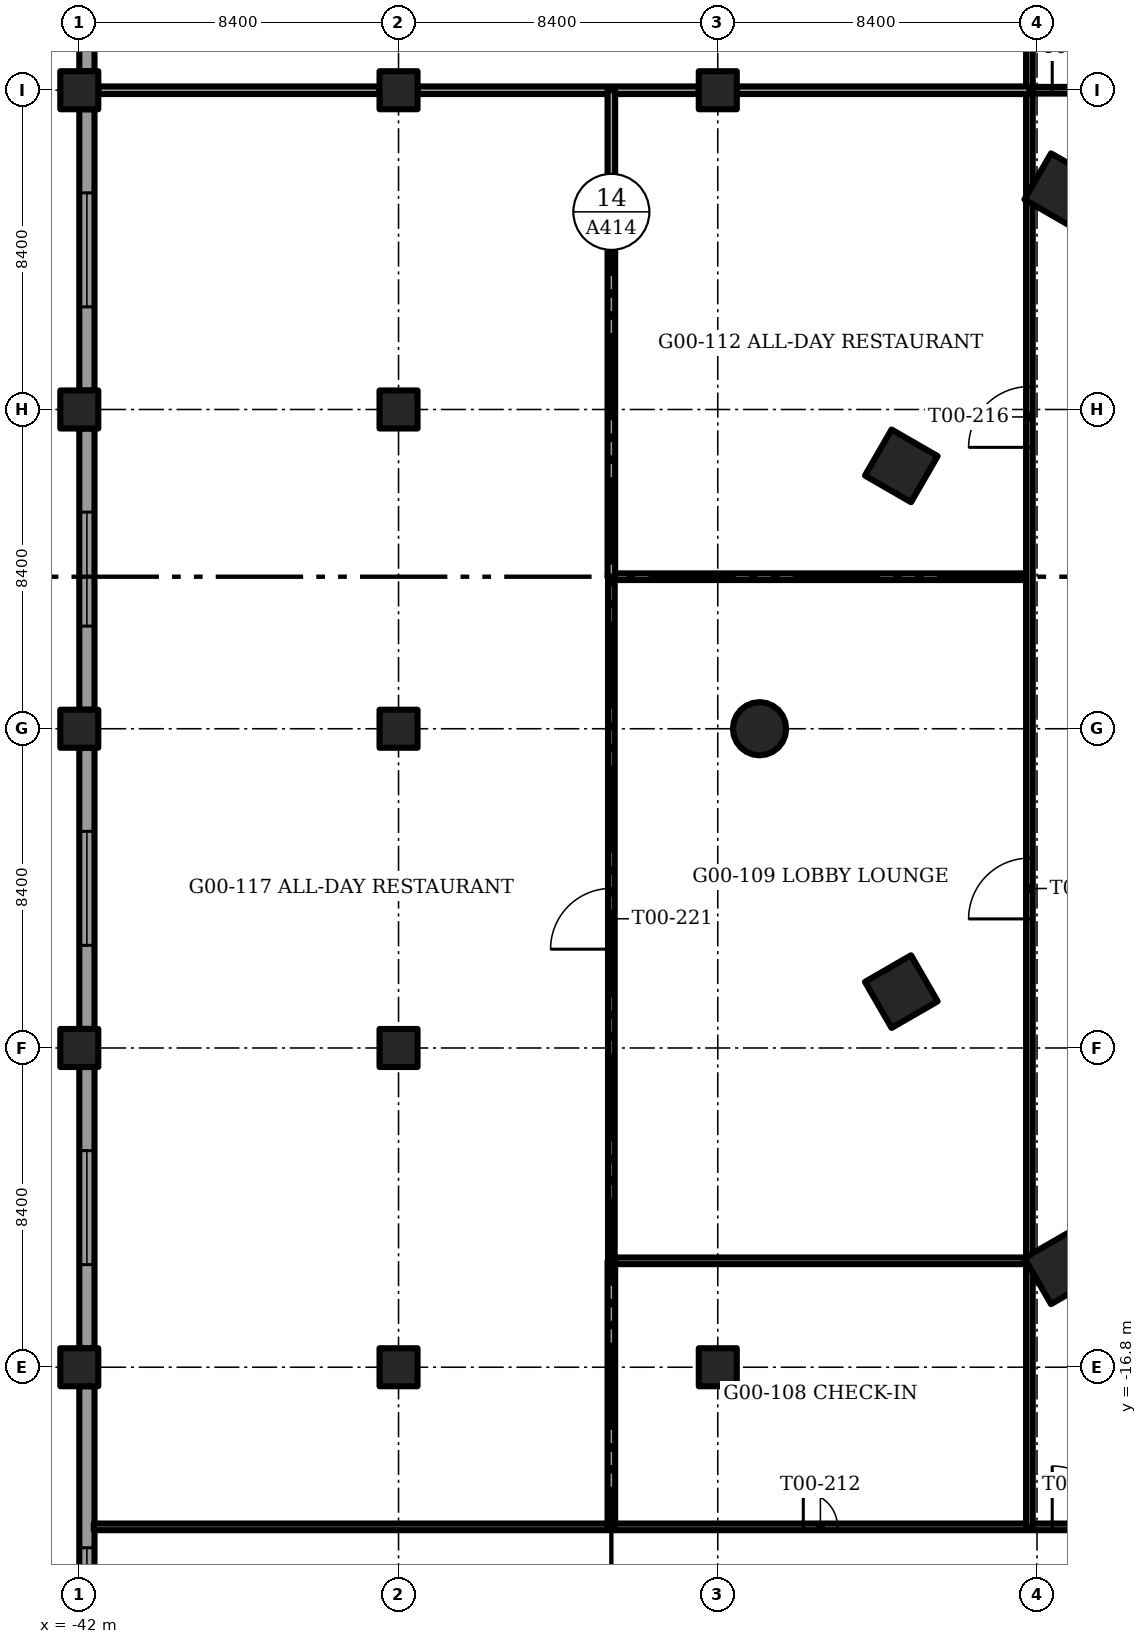
"""IFC4 building model, lengths in metres.
Left out: names, types, materials, properties, quantities, classifications, styles, units other than length and angle.
Written with IfcOpenShell. Run it as: python <this file> out.ifc"""

import sys

from ifc_helpers import new_model, si_unit, direction, frame, frame_2d, origin, origin_2d, place, context, subcontext, project, spatial, rectangle, circle, extrude, element, fill, save


model = new_model("IFC4")
c1 = context("Model", 3, precision=1e-05, world=origin(), true_north=direction((0.0, 1.0)))
c2 = subcontext(c1, "Body", "Model", "MODEL_VIEW")
j1 = project(units=[si_unit("LENGTHUNIT", "METRE"), si_unit("PLANEANGLEUNIT", "RADIAN")], contexts=[c1])
p1 = place(None, origin())
s1 = spatial("IfcSite", under=j1, at=p1, CompositionType="ELEMENT")
p2 = place(p1, origin())
s2 = spatial("IfcBuilding", under=s1, at=p2, CompositionType="ELEMENT")
p3 = place(p2, origin())
s3 = spatial("IfcBuildingStorey", under=s2, at=p3, CompositionType="ELEMENT", Elevation=0.0)
for number, where, z_axis, x_axis in (
    (1, (-42.0, -16.8, -0.35), (0.0, 0.0, 1.0), (1.0, 0.0, 0.0)),
    (2, (-42.0, -8.4, -0.35), (0.0, 0.0, 1.0), (1.0, 0.0, 0.0)),
    (3, (-42.0, 0.0, -0.35), (0.0, 0.0, 1.0), (1.0, 0.0, 0.0)),
    (4, (-42.0, 8.4, -0.35), (0.0, 0.0, 1.0), (1.0, 0.0, 0.0)),
    (5, (-42.0, 16.8, -0.35), (0.0, 0.0, 1.0), (1.0, 0.0, 0.0)),
    (6, (-33.6, -16.8, -0.35), (0.0, 0.0, 1.0), (1.0, 0.0, 0.0)),
    (7, (-33.6, -8.4, -0.35), (0.0, 0.0, 1.0), (1.0, 0.0, 0.0)),
    (8, (-33.6, 0.0, -0.35), (0.0, 0.0, 1.0), (1.0, 0.0, 0.0)),
    (9, (-33.6, 8.4, -0.35), (0.0, 0.0, 1.0), (1.0, 0.0, 0.0)),
    (10, (-33.6, 16.8, -0.35), (0.0, 0.0, 1.0), (1.0, 0.0, 0.0)),
    (11, (-25.2, -16.8, -0.35), (0.0, 0.0, 1.0), (1.0, 0.0, 0.0)),
    (12, (-25.2, 16.8, -0.35), (0.0, 0.0, 1.0), (1.0, 0.0, 0.0)),
):
    element("IfcColumn", number, at=place(p3, frame(where, z_axis=z_axis, x_axis=x_axis)), inside=s3, PredefinedType="COLUMN", context=c2, shape_type="SweptSolid", body=[
        extrude(rectangle(XDim=1.0, YDim=1.0, at=origin_2d()), origin(), (0.0, 0.0, 1.0), 6.0),
    ])
p4 = place(p3, frame((-24.101, 0.0, -0.35), z_axis=(0.0, 0.0, 1.0), x_axis=(1.0, 0.0, 0.0)))
e13 = element("IfcColumn", 13, at=p4, inside=s3, PredefinedType="COLUMN", context=c2, shape_type="SweptSolid", body=[
    extrude(circle(Radius=0.7, at=origin_2d()), origin(), (0.0, 0.0, 1.0), 5.15),
])
for number, where, z_axis, x_axis in (
    (14, (-16.175, 14.183, -0.35), (0.0, 0.0, 1.0), (0.5, 0.866, 0.0)),
    (15, (-20.371, 6.917, -0.35), (0.0, 0.0, 1.0), (0.5, 0.866, 0.0)),
    (16, (-20.371, -6.917, -0.35), (0.0, 0.0, 1.0), (-0.5, 0.866, 0.0)),
    (17, (-16.175, -14.183, -0.35), (0.0, 0.0, 1.0), (-0.5, 0.866, 0.0)),
):
    element("IfcColumn", number, at=place(p3, frame(where, z_axis=z_axis, x_axis=x_axis)), inside=s3, PredefinedType="COLUMN", context=c2, shape_type="SweptSolid", body=[
        extrude(rectangle(XDim=1.4, YDim=1.4, at=origin_2d()), origin(), (0.0, 0.0, 1.0), 5.15),
    ])
p5 = place(p3, frame((-41.8, -28.8, 0.0), z_axis=(0.0, 0.0, 1.0), x_axis=(0.0, 1.0, 0.0)))
e18 = element("IfcWall", 18, at=p5, inside=s3, PredefinedType="SOLIDWALL", context=c2, shape_type="SweptSolid", body=[
    extrude(rectangle(XDim=11.5, YDim=0.4, at=frame_2d((5.75, 0.0))), origin(), (0.0, 0.0, 1.0), 5.65),
])
p6 = place(p5, frame((4.25, 0.0, 1.0)))
e19 = element("IfcOpeningElement", 19, at=p6, cuts=e18, PredefinedType="OPENING", context=c2, shape_type="SweptSolid", body=[
    extrude(rectangle(XDim=3.0, YDim=2.2, at=frame_2d((1.5, 1.1))), frame((0.0, 0.2, 0.0), z_axis=(0.0, -1.0, 0.0), x_axis=(1.0, 0.0, 0.0)), (0.0, 0.0, 1.0), 0.4),
])
p7 = place(p3, frame((-41.8, -16.3, 0.0), z_axis=(0.0, 0.0, 1.0), x_axis=(0.0, 1.0, 0.0)))
e20 = element("IfcWall", 20, at=p7, inside=s3, PredefinedType="SOLIDWALL", context=c2, shape_type="SweptSolid", body=[
    extrude(rectangle(XDim=7.4, YDim=0.4, at=frame_2d((3.7, 0.0))), origin(), (0.0, 0.0, 1.0), 5.65),
])
p8 = place(p7, frame((2.2, 0.0, 1.0)))
e21 = element("IfcOpeningElement", 21, at=p8, cuts=e20, PredefinedType="OPENING", context=c2, shape_type="SweptSolid", body=[
    extrude(rectangle(XDim=3.0, YDim=2.2, at=frame_2d((1.5, 1.1))), frame((0.0, 0.2, 0.0), z_axis=(0.0, -1.0, 0.0), x_axis=(1.0, 0.0, 0.0)), (0.0, 0.0, 1.0), 0.4),
])
p9 = place(p3, frame((-41.8, -7.9, 0.0), z_axis=(0.0, 0.0, 1.0), x_axis=(0.0, 1.0, 0.0)))
e22 = element("IfcWall", 22, at=p9, inside=s3, PredefinedType="SOLIDWALL", context=c2, shape_type="SweptSolid", body=[
    extrude(rectangle(XDim=7.4, YDim=0.4, at=frame_2d((3.7, 0.0))), origin(), (0.0, 0.0, 1.0), 5.65),
])
p10 = place(p9, frame((2.2, 0.0, 1.0)))
e23 = element("IfcOpeningElement", 23, at=p10, cuts=e22, PredefinedType="OPENING", context=c2, shape_type="SweptSolid", body=[
    extrude(rectangle(XDim=3.0, YDim=2.2, at=frame_2d((1.5, 1.1))), frame((0.0, 0.2, 0.0), z_axis=(0.0, -1.0, 0.0), x_axis=(1.0, 0.0, 0.0)), (0.0, 0.0, 1.0), 0.4),
])
p11 = place(p3, frame((-41.8, 0.5, 0.0), z_axis=(0.0, 0.0, 1.0), x_axis=(0.0, 1.0, 0.0)))
e24 = element("IfcWall", 24, at=p11, inside=s3, PredefinedType="SOLIDWALL", context=c2, shape_type="SweptSolid", body=[
    extrude(rectangle(XDim=7.4, YDim=0.4, at=frame_2d((3.7, 0.0))), origin(), (0.0, 0.0, 1.0), 5.65),
])
p12 = place(p11, frame((2.2, 0.0, 1.0)))
e25 = element("IfcOpeningElement", 25, at=p12, cuts=e24, PredefinedType="OPENING", context=c2, shape_type="SweptSolid", body=[
    extrude(rectangle(XDim=3.0, YDim=2.2, at=frame_2d((1.5, 1.1))), frame((0.0, 0.2, 0.0), z_axis=(0.0, -1.0, 0.0), x_axis=(1.0, 0.0, 0.0)), (0.0, 0.0, 1.0), 0.4),
])
p13 = place(p3, frame((-41.8, 8.9, 0.0), z_axis=(0.0, 0.0, 1.0), x_axis=(0.0, 1.0, 0.0)))
e26 = element("IfcWall", 26, at=p13, inside=s3, PredefinedType="SOLIDWALL", context=c2, shape_type="SweptSolid", body=[
    extrude(rectangle(XDim=7.4, YDim=0.4, at=frame_2d((3.7, 0.0))), origin(), (0.0, 0.0, 1.0), 5.65),
])
p14 = place(p13, frame((2.2, 0.0, 1.0)))
e27 = element("IfcOpeningElement", 27, at=p14, cuts=e26, PredefinedType="OPENING", context=c2, shape_type="SweptSolid", body=[
    extrude(rectangle(XDim=3.0, YDim=2.2, at=frame_2d((1.5, 1.1))), frame((0.0, 0.2, 0.0), z_axis=(0.0, -1.0, 0.0), x_axis=(1.0, 0.0, 0.0)), (0.0, 0.0, 1.0), 0.4),
])
p15 = place(p3, frame((-41.8, 17.3, 0.0), z_axis=(0.0, 0.0, 1.0), x_axis=(0.0, 1.0, 0.0)))
e28 = element("IfcWall", 28, at=p15, inside=s3, PredefinedType="SOLIDWALL", context=c2, shape_type="SweptSolid", body=[
    extrude(rectangle(XDim=7.4, YDim=0.4, at=frame_2d((3.7, 0.0))), origin(), (0.0, 0.0, 1.0), 5.65),
])
p16 = place(p15, frame((2.2, 0.0, 1.0)))
e29 = element("IfcOpeningElement", 29, at=p16, cuts=e28, PredefinedType="OPENING", context=c2, shape_type="SweptSolid", body=[
    extrude(rectangle(XDim=3.0, YDim=2.2, at=frame_2d((1.5, 1.1))), frame((0.0, 0.2, 0.0), z_axis=(0.0, -1.0, 0.0), x_axis=(1.0, 0.0, 0.0)), (0.0, 0.0, 1.0), 0.4),
])
p17 = place(p3, frame((-41.62, -21.0, 0.0), z_axis=(0.0, 0.0, 1.0), x_axis=(1.0, 0.0, 0.0)))
e30 = element("IfcWall", 30, at=p17, inside=s3, PredefinedType="PARTITIONING", context=c2, shape_type="SweptSolid", body=[
    extrude(rectangle(XDim=27.42, YDim=0.175, at=frame_2d((13.71, 0.0))), origin(), (0.0, 0.0, 1.0), 5.65),
])
p18 = place(p17, frame((25.22, 0.0, 0.0)))
e31 = element("IfcOpeningElement", 31, at=p18, cuts=e30, PredefinedType="OPENING", context=c2, shape_type="SweptSolid", body=[
    extrude(rectangle(XDim=1.6, YDim=2.1, at=frame_2d((0.8, 1.05))), frame((0.0, 0.087, 0.0), z_axis=(0.0, -1.0, 0.0), x_axis=(1.0, 0.0, 0.0)), (0.0, 0.0, 1.0), 0.175),
])
p19 = place(p17, frame((18.67, 0.0, 0.0)))
e32 = element("IfcOpeningElement", 32, at=p19, cuts=e30, PredefinedType="OPENING", context=c2, shape_type="SweptSolid", body=[
    extrude(rectangle(XDim=0.9, YDim=2.1, at=frame_2d((0.45, 1.05))), frame((0.0, 0.087, 0.0), z_axis=(0.0, -1.0, 0.0), x_axis=(1.0, 0.0, 0.0)), (0.0, 0.0, 1.0), 0.175),
])
p20 = place(p3, frame((-28.0, -14.0, 0.0), z_axis=(0.0, 0.0, 1.0), x_axis=(1.0, 0.0, 0.0)))
e33 = element("IfcWall", 33, at=p20, inside=s3, PredefinedType="PARTITIONING", context=c2, shape_type="SweptSolid", body=[
    extrude(rectangle(XDim=11.0, YDim=0.175, at=frame_2d((5.5, 0.0))), origin(), (0.0, 0.0, 1.0), 5.65),
])
p21 = place(p3, frame((-28.0, 4.0, 0.0), z_axis=(0.0, 0.0, 1.0), x_axis=(1.0, 0.0, 0.0)))
e34 = element("IfcWall", 34, at=p21, inside=s3, PredefinedType="PARTITIONING", context=c2, shape_type="SweptSolid", body=[
    extrude(rectangle(XDim=11.0, YDim=0.175, at=frame_2d((5.5, 0.0))), origin(), (0.0, 0.0, 1.0), 4.8),
])
p22 = place(p3, frame((-17.0, 16.8, 0.0), z_axis=(0.0, 0.0, 1.0), x_axis=(1.0, 0.0, 0.0)))
e35 = element("IfcWall", 35, at=p22, inside=s3, PredefinedType="PARTITIONING", context=c2, shape_type="SweptSolid", body=[
    extrude(rectangle(XDim=2.8, YDim=0.175, at=frame_2d((1.4, 0.0))), origin(), (0.0, 0.0, 1.0), 4.8),
])
p23 = place(p22, frame((0.6, 0.0, 0.0)))
e36 = element("IfcOpeningElement", 36, at=p23, cuts=e35, PredefinedType="OPENING", context=c2, shape_type="SweptSolid", body=[
    extrude(rectangle(XDim=1.6, YDim=2.1, at=frame_2d((0.8, 1.05))), frame((0.0, 0.087, 0.0), z_axis=(0.0, -1.0, 0.0), x_axis=(1.0, 0.0, 0.0)), (0.0, 0.0, 1.0), 0.175),
])
p24 = place(p3, frame((-28.0, -14.0, 0.0), z_axis=(0.0, 0.0, 1.0), x_axis=(0.0, 1.0, 0.0)))
e37 = element("IfcWall", 37, at=p24, inside=s3, PredefinedType="PARTITIONING", context=c2, shape_type="SweptSolid", body=[
    extrude(rectangle(XDim=18.0, YDim=0.175, at=frame_2d((9.0, 0.0))), origin(), (0.0, 0.0, 1.0), 5.65),
])
p25 = place(p24, frame((8.2, 0.0, 0.0)))
e38 = element("IfcOpeningElement", 38, at=p25, cuts=e37, PredefinedType="OPENING", context=c2, shape_type="SweptSolid", body=[
    extrude(rectangle(XDim=1.6, YDim=2.1, at=frame_2d((0.8, 1.05))), frame((0.0, 0.087, 0.0), z_axis=(0.0, -1.0, 0.0), x_axis=(1.0, 0.0, 0.0)), (0.0, 0.0, 1.0), 0.175),
])
p26 = place(p3, frame((-17.0, -21.0, 0.0), z_axis=(0.0, 0.0, 1.0), x_axis=(0.0, 1.0, 0.0)))
e39 = element("IfcWall", 39, at=p26, inside=s3, PredefinedType="PARTITIONING", context=c2, shape_type="SweptSolid", body=[
    extrude(rectangle(XDim=46.2, YDim=0.175, at=frame_2d((23.1, 0.0))), origin(), (0.0, 0.0, 1.0), 4.8),
])
p27 = place(p26, frame((15.996, 0.0, 0.0)))
e40 = element("IfcOpeningElement", 40, at=p27, cuts=e39, PredefinedType="OPENING", context=c2, shape_type="SweptSolid", body=[
    extrude(rectangle(XDim=1.6, YDim=2.1, at=frame_2d((0.8, 1.05))), frame((0.0, 0.087, 0.0), z_axis=(0.0, -1.0, 0.0), x_axis=(1.0, 0.0, 0.0)), (0.0, 0.0, 1.0), 0.175),
])
p28 = place(p26, frame((28.404, 0.0, 0.0)))
e41 = element("IfcOpeningElement", 41, at=p28, cuts=e39, PredefinedType="OPENING", context=c2, shape_type="SweptSolid", body=[
    extrude(rectangle(XDim=1.6, YDim=2.1, at=frame_2d((0.8, 1.05))), frame((0.0, 0.087, 0.0), z_axis=(0.0, -1.0, 0.0), x_axis=(1.0, 0.0, 0.0)), (0.0, 0.0, 1.0), 0.175),
])
p29 = place(p26, frame((41.2, 0.0, 0.0)))
e42 = element("IfcOpeningElement", 42, at=p29, cuts=e39, PredefinedType="OPENING", context=c2, shape_type="SweptSolid", body=[
    extrude(rectangle(XDim=1.6, YDim=2.1, at=frame_2d((0.8, 1.05))), frame((0.0, 0.087, 0.0), z_axis=(0.0, -1.0, 0.0), x_axis=(1.0, 0.0, 0.0)), (0.0, 0.0, 1.0), 0.175),
])
p30 = place(p3, frame((-41.5, 16.8, 0.0), z_axis=(0.0, 0.0, 1.0), x_axis=(1.0, 0.0, 0.0)))
e43 = element("IfcWall", 43, at=p30, inside=s3, PredefinedType="PARTITIONING", context=c2, shape_type="SweptSolid", body=[
    extrude(rectangle(XDim=7.4, YDim=0.2, at=frame_2d((3.7, 0.0))), origin(), (0.0, 0.0, 1.0), 5.65),
])
p31 = place(p3, frame((-33.1, 16.8, 0.0), z_axis=(0.0, 0.0, 1.0), x_axis=(1.0, 0.0, 0.0)))
e44 = element("IfcWall", 44, at=p31, inside=s3, PredefinedType="PARTITIONING", context=c2, shape_type="SweptSolid", body=[
    extrude(rectangle(XDim=7.4, YDim=0.2, at=frame_2d((3.7, 0.0))), origin(), (0.0, 0.0, 1.0), 5.65),
])
p32 = place(p3, frame((-24.7, 16.8, 0.0), z_axis=(0.0, 0.0, 1.0), x_axis=(1.0, 0.0, 0.0)))
e45 = element("IfcWall", 45, at=p32, inside=s3, PredefinedType="PARTITIONING", context=c2, shape_type="SweptSolid", body=[
    extrude(rectangle(XDim=7.7, YDim=0.2, at=frame_2d((3.85, 0.0))), origin(), (0.0, 0.0, 1.0), 5.65),
])
p33 = place(p3, frame((-28.0, -21.0, 0.0), z_axis=(0.0, 0.0, 1.0), x_axis=(0.0, 1.0, 0.0)))
e46 = element("IfcWall", 46, at=p33, inside=s3, PredefinedType="PARTITIONING", context=c2, shape_type="SweptSolid", body=[
    extrude(rectangle(XDim=7.0, YDim=0.2, at=frame_2d((3.5, 0.0))), origin(), (0.0, 0.0, 1.0), 5.65),
])
p34 = place(p3, frame((-28.0, 4.0, 0.0), z_axis=(0.0, 0.0, 1.0), x_axis=(0.0, 1.0, 0.0)))
e47 = element("IfcWall", 47, at=p34, inside=s3, PredefinedType="PARTITIONING", context=c2, shape_type="SweptSolid", body=[
    extrude(rectangle(XDim=12.8, YDim=0.2, at=frame_2d((6.4, 0.0))), origin(), (0.0, 0.0, 1.0), 5.65),
])
p35 = place(p6, origin())
e48 = element("IfcWindow", 48, at=p35, inside=s3, PartitioningType="SINGLE_PANEL", PredefinedType="WINDOW", context=c2, shape_type="SweptSolid", body=[
    extrude(rectangle(XDim=3.0, YDim=2.2, at=frame_2d((1.5, 1.1))), frame((0.0, 0.03, 0.0), z_axis=(0.0, -1.0, 0.0), x_axis=(1.0, 0.0, 0.0)), (0.0, 0.0, 1.0), 0.06),
])
fill(e19, e48)
p36 = place(p8, origin())
e49 = element("IfcWindow", 49, at=p36, inside=s3, PartitioningType="SINGLE_PANEL", PredefinedType="WINDOW", context=c2, shape_type="SweptSolid", body=[
    extrude(rectangle(XDim=3.0, YDim=2.2, at=frame_2d((1.5, 1.1))), frame((0.0, 0.03, 0.0), z_axis=(0.0, -1.0, 0.0), x_axis=(1.0, 0.0, 0.0)), (0.0, 0.0, 1.0), 0.06),
])
fill(e21, e49)
p37 = place(p10, origin())
e50 = element("IfcWindow", 50, at=p37, inside=s3, PartitioningType="SINGLE_PANEL", PredefinedType="WINDOW", context=c2, shape_type="SweptSolid", body=[
    extrude(rectangle(XDim=3.0, YDim=2.2, at=frame_2d((1.5, 1.1))), frame((0.0, 0.03, 0.0), z_axis=(0.0, -1.0, 0.0), x_axis=(1.0, 0.0, 0.0)), (0.0, 0.0, 1.0), 0.06),
])
fill(e23, e50)
p38 = place(p12, origin())
e51 = element("IfcWindow", 51, at=p38, inside=s3, PartitioningType="SINGLE_PANEL", PredefinedType="WINDOW", context=c2, shape_type="SweptSolid", body=[
    extrude(rectangle(XDim=3.0, YDim=2.2, at=frame_2d((1.5, 1.1))), frame((0.0, 0.03, 0.0), z_axis=(0.0, -1.0, 0.0), x_axis=(1.0, 0.0, 0.0)), (0.0, 0.0, 1.0), 0.06),
])
fill(e25, e51)
p39 = place(p14, origin())
e52 = element("IfcWindow", 52, at=p39, inside=s3, PartitioningType="SINGLE_PANEL", PredefinedType="WINDOW", context=c2, shape_type="SweptSolid", body=[
    extrude(rectangle(XDim=3.0, YDim=2.2, at=frame_2d((1.5, 1.1))), frame((0.0, 0.03, 0.0), z_axis=(0.0, -1.0, 0.0), x_axis=(1.0, 0.0, 0.0)), (0.0, 0.0, 1.0), 0.06),
])
fill(e27, e52)
p40 = place(p18, origin())
e53 = element("IfcDoor", 53, at=p40, inside=s3, OperationType="DOUBLE_DOOR_SINGLE_SWING", PredefinedType="DOOR", context=c2, shape_type="SweptSolid", body=[
    extrude(rectangle(XDim=1.6, YDim=2.1, at=frame_2d((0.8, 1.05))), frame((0.0, 0.025, 0.0), z_axis=(0.0, -1.0, 0.0), x_axis=(1.0, 0.0, 0.0)), (0.0, 0.0, 1.0), 0.05),
])
fill(e31, e53)
p41 = place(p23, origin())
e54 = element("IfcDoor", 54, at=p41, inside=s3, OperationType="DOUBLE_DOOR_SINGLE_SWING", PredefinedType="DOOR", context=c2, shape_type="SweptSolid", body=[
    extrude(rectangle(XDim=1.6, YDim=2.1, at=frame_2d((0.8, 1.05))), frame((0.0, 0.025, 0.0), z_axis=(0.0, -1.0, 0.0), x_axis=(1.0, 0.0, 0.0)), (0.0, 0.0, 1.0), 0.05),
])
fill(e36, e54)
p42 = place(p19, origin())
e55 = element("IfcDoor", 55, at=p42, inside=s3, OperationType="SINGLE_SWING_RIGHT", PredefinedType="DOOR", context=c2, shape_type="SweptSolid", body=[
    extrude(rectangle(XDim=0.9, YDim=2.1, at=frame_2d((0.45, 1.05))), frame((0.0, 0.025, 0.0), z_axis=(0.0, -1.0, 0.0), x_axis=(1.0, 0.0, 0.0)), (0.0, 0.0, 1.0), 0.05),
])
fill(e32, e55)
p43 = place(p27, origin())
e56 = element("IfcDoor", 56, at=p43, inside=s3, OperationType="DOUBLE_DOOR_SINGLE_SWING", PredefinedType="DOOR", context=c2, shape_type="SweptSolid", body=[
    extrude(rectangle(XDim=1.6, YDim=2.1, at=frame_2d((0.8, 1.05))), frame((0.0, 0.025, 0.0), z_axis=(0.0, -1.0, 0.0), x_axis=(1.0, 0.0, 0.0)), (0.0, 0.0, 1.0), 0.05),
])
fill(e40, e56)
p44 = place(p28, origin())
e57 = element("IfcDoor", 57, at=p44, inside=s3, OperationType="DOUBLE_DOOR_SINGLE_SWING", PredefinedType="DOOR", context=c2, shape_type="SweptSolid", body=[
    extrude(rectangle(XDim=1.6, YDim=2.1, at=frame_2d((0.8, 1.05))), frame((0.0, 0.025, 0.0), z_axis=(0.0, -1.0, 0.0), x_axis=(1.0, 0.0, 0.0)), (0.0, 0.0, 1.0), 0.05),
])
fill(e41, e57)
p45 = place(p25, origin())
e58 = element("IfcDoor", 58, at=p45, inside=s3, OperationType="DOUBLE_DOOR_SINGLE_SWING", PredefinedType="DOOR", context=c2, shape_type="SweptSolid", body=[
    extrude(rectangle(XDim=1.6, YDim=2.1, at=frame_2d((0.8, 1.05))), frame((0.0, 0.025, 0.0), z_axis=(0.0, -1.0, 0.0), x_axis=(1.0, 0.0, 0.0)), (0.0, 0.0, 1.0), 0.05),
])
fill(e38, e58)
save(model, sys.argv[1])
